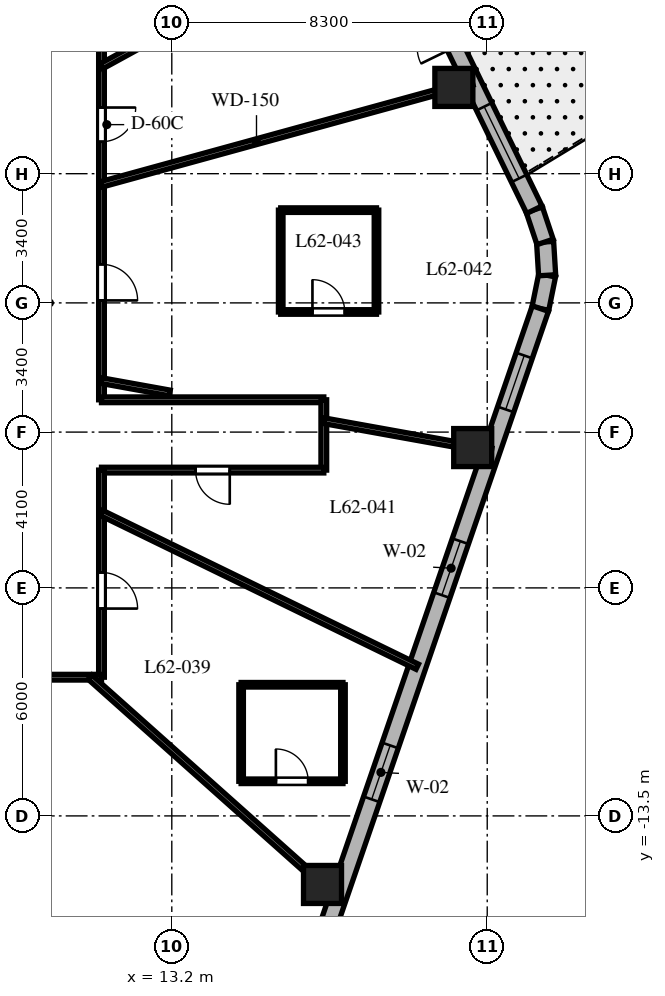
"""IFC4 building model, lengths in metres.
Left out: names, types, materials, properties, quantities, classifications, styles, units other than length and angle.
Written with IfcOpenShell. Run it as: python <this file> out.ifc"""

import sys

from ifc_helpers import new_model, si_unit, direction, frame, frame_2d, origin, origin_2d, place, context, subcontext, project, spatial, rectangle, extrude, element, fill, save


model = new_model("IFC4")
c1 = context("Model", 3, precision=1e-05, world=origin(), true_north=direction((0.0, 1.0)))
c2 = subcontext(c1, "Body", "Model", "MODEL_VIEW")
j1 = project(units=[si_unit("LENGTHUNIT", "METRE"), si_unit("PLANEANGLEUNIT", "RADIAN")], contexts=[c1])
p1 = place(None, origin())
s1 = spatial("IfcSite", under=j1, at=p1, CompositionType="ELEMENT")
p2 = place(p1, origin())
s2 = spatial("IfcBuilding", under=s1, at=p2, CompositionType="ELEMENT")
p3 = place(p2, frame((0.0, 0.0, 248.3)))
s3 = spatial("IfcBuildingStorey", under=s2, at=p3, CompositionType="ELEMENT", Elevation=248.3)
for number, where, z_axis, x_axis in (
    (1, (17.166, -15.304, 0.0), (0.0, 0.0, 1.0), (1.0, 0.0, 0.0)),
    (2, (21.118, -3.807, 0.0), (0.0, 0.0, 1.0), (1.0, 0.0, 0.0)),
    (3, (20.622, 5.67, 0.0), (0.0, 0.0, 1.0), (1.0, 0.0, 0.0)),
):
    element("IfcColumn", number, at=place(p3, frame(where, z_axis=z_axis, x_axis=x_axis)), inside=s3, PredefinedType="COLUMN", context=c2, shape_type="SweptSolid", body=[
        extrude(rectangle(XDim=1.0, YDim=1.0, at=origin_2d()), origin(), (0.0, 0.0, 1.0), 3.8),
    ])
p4 = place(p3, frame((22.898, -0.15, 0.0), z_axis=(0.0, 0.0, 1.0), x_axis=(0.199055826889, 0.979988151858, 0.0)))
e4 = element("IfcWall", 4, at=p4, inside=s3, PredefinedType="SOLIDWALL", context=c2, shape_type="SweptSolid", body=[
    extrude(rectangle(XDim=0.894, YDim=0.45, at=frame_2d((0.447, 0.0))), origin(), (0.0, 0.0, 1.0), 3.5),
])
p5 = place(p3, frame((23.076, 0.727, 0.0), z_axis=(0.0, 0.0, 1.0), x_axis=(-0.060805222108, 0.998149650586, 0.0)))
e5 = element("IfcWall", 5, at=p5, inside=s3, PredefinedType="SOLIDWALL", context=c2, shape_type="SweptSolid", body=[
    extrude(rectangle(XDim=0.879, YDim=0.45, at=frame_2d((0.44, 0.0))), origin(), (0.0, 0.0, 1.0), 3.5),
])
p6 = place(p3, frame((23.023, 1.604, 0.0), z_axis=(0.0, 0.0, 1.0), x_axis=(-0.316801227695, 0.948491951537, 0.0)))
e6 = element("IfcWall", 6, at=p6, inside=s3, PredefinedType="SOLIDWALL", context=c2, shape_type="SweptSolid", body=[
    extrude(rectangle(XDim=0.894, YDim=0.45, at=frame_2d((0.447, 0.0))), origin(), (0.0, 0.0, 1.0), 3.5),
])
p7 = place(p3, frame((16.324, -19.275, 0.0), z_axis=(0.0, 0.0, 1.0), x_axis=(0.325083142304, 0.945685439557, 0.0)))
e7 = element("IfcWall", 7, at=p7, inside=s3, PredefinedType="SOLIDWALL", context=c2, shape_type="SweptSolid", body=[
    extrude(rectangle(XDim=20.224, YDim=0.45, at=frame_2d((10.112, 0.0))), origin(), (0.0, 0.0, 1.0), 3.5),
])
p8 = place(p7, frame((1.253, 0.0, 0.8)))
e8 = element("IfcOpeningElement", 8, at=p8, cuts=e7, PredefinedType="OPENING", context=c2, shape_type="SweptSolid", body=[
    extrude(rectangle(XDim=1.5, YDim=1.8, at=frame_2d((0.75, 0.9))), frame((0.0, 0.235, 0.0), z_axis=(0.0, -1.0, 0.0), x_axis=(1.0, 0.0, 0.0)), (0.0, 0.0, 1.0), 0.47),
])
p9 = place(p7, frame((6.568, 0.0, 0.8)))
e9 = element("IfcOpeningElement", 9, at=p9, cuts=e7, PredefinedType="OPENING", context=c2, shape_type="SweptSolid", body=[
    extrude(rectangle(XDim=1.5, YDim=1.8, at=frame_2d((0.75, 0.9))), frame((0.0, 0.235, 0.0), z_axis=(0.0, -1.0, 0.0), x_axis=(1.0, 0.0, 0.0)), (0.0, 0.0, 1.0), 0.47),
])
p10 = place(p7, frame((12.25, 0.0, 0.8)))
e10 = element("IfcOpeningElement", 10, at=p10, cuts=e7, PredefinedType="OPENING", context=c2, shape_type="SweptSolid", body=[
    extrude(rectangle(XDim=1.5, YDim=1.8, at=frame_2d((0.75, 0.9))), frame((0.0, 0.235, 0.0), z_axis=(0.0, -1.0, 0.0), x_axis=(1.0, 0.0, 0.0)), (0.0, 0.0, 1.0), 0.47),
])
p11 = place(p7, frame((17.418, 0.0, 0.8)))
e11 = element("IfcOpeningElement", 11, at=p11, cuts=e7, PredefinedType="OPENING", context=c2, shape_type="SweptSolid", body=[
    extrude(rectangle(XDim=1.5, YDim=1.8, at=frame_2d((0.75, 0.9))), frame((0.0, 0.235, 0.0), z_axis=(0.0, -1.0, 0.0), x_axis=(1.0, 0.0, 0.0)), (0.0, 0.0, 1.0), 0.47),
])
p12 = place(p3, frame((22.74, 2.452, 0.0), z_axis=(0.0, 0.0, 1.0), x_axis=(-0.437753424814, 0.899095066755, 0.0)))
e12 = element("IfcWall", 12, at=p12, inside=s3, PredefinedType="SOLIDWALL", context=c2, shape_type="SweptSolid", body=[
    extrude(rectangle(XDim=19.137, YDim=0.45, at=frame_2d((9.569, 0.0))), origin(), (0.0, 0.0, 1.0), 3.5),
])
p13 = place(p12, frame((4.763, 0.0, 0.0)))
e13 = element("IfcOpeningElement", 13, at=p13, cuts=e12, PredefinedType="OPENING", context=c2, shape_type="SweptSolid", body=[
    extrude(rectangle(XDim=1.0, YDim=2.15, at=frame_2d((0.5, 1.075))), frame((0.0, 0.235, 0.0), z_axis=(0.0, -1.0, 0.0), x_axis=(1.0, 0.0, 0.0)), (0.0, 0.0, 1.0), 0.47),
])
p14 = place(p12, frame((6.611, 0.0, 0.8)))
e14 = element("IfcOpeningElement", 14, at=p14, cuts=e12, PredefinedType="OPENING", context=c2, shape_type="SweptSolid", body=[
    extrude(rectangle(XDim=1.2, YDim=1.8, at=frame_2d((0.6, 0.9))), frame((0.0, 0.235, 0.0), z_axis=(0.0, -1.0, 0.0), x_axis=(1.0, 0.0, 0.0)), (0.0, 0.0, 1.0), 0.47),
])
p15 = place(p12, frame((10.856, 0.0, 0.8)))
e15 = element("IfcOpeningElement", 15, at=p15, cuts=e12, PredefinedType="OPENING", context=c2, shape_type="SweptSolid", body=[
    extrude(rectangle(XDim=2.1, YDim=1.85, at=frame_2d((1.05, 0.925))), frame((0.0, 0.235, 0.0), z_axis=(0.0, -1.0, 0.0), x_axis=(1.0, 0.0, 0.0)), (0.0, 0.0, 1.0), 0.47),
])
p16 = place(p12, frame((16.173, 0.0, 0.8)))
e16 = element("IfcOpeningElement", 16, at=p16, cuts=e12, PredefinedType="OPENING", context=c2, shape_type="SweptSolid", body=[
    extrude(rectangle(XDim=2.1, YDim=1.85, at=frame_2d((1.05, 0.925))), frame((0.0, 0.235, 0.0), z_axis=(0.0, -1.0, 0.0), x_axis=(1.0, 0.0, 0.0)), (0.0, 0.0, 1.0), 0.47),
])
p17 = place(p12, frame((0.916, 0.0, 0.8)))
e17 = element("IfcOpeningElement", 17, at=p17, cuts=e12, PredefinedType="OPENING", context=c2, shape_type="SweptSolid", body=[
    extrude(rectangle(XDim=2.1, YDim=1.85, at=frame_2d((1.05, 0.925))), frame((0.0, 0.235, 0.0), z_axis=(0.0, -1.0, 0.0), x_axis=(1.0, 0.0, 0.0)), (0.0, 0.0, 1.0), 0.47),
])
p18 = place(p3, frame((11.35, 9.85, 0.0), z_axis=(0.0, 0.0, 1.0), x_axis=(0.0, -1.0, 0.0)))
e18 = element("IfcWall", 18, at=p18, inside=s3, PredefinedType="PARTITIONING", context=c2, shape_type="SweptSolid", body=[
    extrude(rectangle(XDim=12.4, YDim=0.15, at=frame_2d((6.2, 0.0))), origin(), (0.0, 0.0, 1.0), 2.99),
])
p19 = place(p18, frame((4.709, 0.0, 0.0)))
e19 = element("IfcOpeningElement", 19, at=p19, cuts=e18, PredefinedType="OPENING", context=c2, shape_type="SweptSolid", body=[
    extrude(rectangle(XDim=0.9, YDim=2.03, at=frame_2d((0.45, 1.015))), frame((0.0, 0.085, 0.0), z_axis=(0.0, -1.0, 0.0), x_axis=(1.0, 0.0, 0.0)), (0.0, 0.0, 1.0), 0.17),
])
p20 = place(p18, frame((1.457, 0.0, 0.0)))
e20 = element("IfcOpeningElement", 20, at=p20, cuts=e18, PredefinedType="OPENING", context=c2, shape_type="SweptSolid", body=[
    extrude(rectangle(XDim=0.95, YDim=2.03, at=frame_2d((0.475, 1.015))), frame((0.0, 0.085, 0.0), z_axis=(0.0, -1.0, 0.0), x_axis=(1.0, 0.0, 0.0)), (0.0, 0.0, 1.0), 0.17),
])
p21 = place(p18, frame((8.835, 0.0, 0.0)))
e21 = element("IfcOpeningElement", 21, at=p21, cuts=e18, PredefinedType="OPENING", context=c2, shape_type="SweptSolid", body=[
    extrude(rectangle(XDim=0.95, YDim=2.03, at=frame_2d((0.475, 1.015))), frame((0.0, 0.085, 0.0), z_axis=(0.0, -1.0, 0.0), x_axis=(1.0, 0.0, 0.0)), (0.0, 0.0, 1.0), 0.17),
])
p22 = place(p3, frame((11.35, -2.55, 0.0), z_axis=(0.0, 0.0, 1.0), x_axis=(1.0, 0.0, 0.0)))
e22 = element("IfcWall", 22, at=p22, inside=s3, PredefinedType="PARTITIONING", context=c2, shape_type="SweptSolid", body=[
    extrude(rectangle(XDim=5.85, YDim=0.15, at=frame_2d((2.925, 0.0))), origin(), (0.0, 0.0, 1.0), 2.94),
])
p23 = place(p3, frame((17.2, -2.55, 0.0), z_axis=(0.0, 0.0, 1.0), x_axis=(0.0, -1.0, 0.0)))
e23 = element("IfcWall", 23, at=p23, inside=s3, PredefinedType="PARTITIONING", context=c2, shape_type="SweptSolid", body=[
    extrude(rectangle(XDim=1.85, YDim=0.15, at=frame_2d((0.925, 0.0))), origin(), (0.0, 0.0, 1.0), 2.94),
])
p24 = place(p3, frame((17.2, -4.4, 0.0), z_axis=(0.0, 0.0, 1.0), x_axis=(-1.0, 0.0, 0.0)))
e24 = element("IfcWall", 24, at=p24, inside=s3, PredefinedType="PARTITIONING", context=c2, shape_type="SweptSolid", body=[
    extrude(rectangle(XDim=5.85, YDim=0.15, at=frame_2d((2.925, 0.0))), origin(), (0.0, 0.0, 1.0), 2.94),
])
p25 = place(p24, frame((2.475, 0.0, 0.0)))
e25 = element("IfcOpeningElement", 25, at=p25, cuts=e24, PredefinedType="OPENING", context=c2, shape_type="SweptSolid", body=[
    extrude(rectangle(XDim=0.9, YDim=2.03, at=frame_2d((0.45, 1.015))), frame((0.0, 0.085, 0.0), z_axis=(0.0, -1.0, 0.0), x_axis=(1.0, 0.0, 0.0)), (0.0, 0.0, 1.0), 0.17),
])
p26 = place(p3, frame((11.35, -4.4, 0.0), z_axis=(0.0, 0.0, 1.0), x_axis=(0.0, -1.0, 0.0)))
e26 = element("IfcWall", 26, at=p26, inside=s3, PredefinedType="PARTITIONING", context=c2, shape_type="SweptSolid", body=[
    extrude(rectangle(XDim=5.45, YDim=0.15, at=frame_2d((2.725, 0.0))), origin(), (0.0, 0.0, 1.0), 2.99),
])
p27 = place(p26, frame((2.694, 0.0, 0.0)))
e27 = element("IfcOpeningElement", 27, at=p27, cuts=e26, PredefinedType="OPENING", context=c2, shape_type="SweptSolid", body=[
    extrude(rectangle(XDim=0.95, YDim=2.03, at=frame_2d((0.475, 1.015))), frame((0.0, 0.085, 0.0), z_axis=(0.0, -1.0, 0.0), x_axis=(1.0, 0.0, 0.0)), (0.0, 0.0, 1.0), 0.17),
])
p28 = place(p3, frame((11.35, -9.85, 0.0), z_axis=(0.0, 0.0, 1.0), x_axis=(-1.0, 0.0, 0.0)))
e28 = element("IfcWall", 28, at=p28, inside=s3, PredefinedType="PARTITIONING", context=c2, shape_type="SweptSolid", body=[
    extrude(rectangle(XDim=10.43, YDim=0.15, at=frame_2d((5.215, 0.0))), origin(), (0.0, 0.0, 1.0), 2.99),
])
p29 = place(p28, frame((8.362, 0.0, 0.0)))
e29 = element("IfcOpeningElement", 29, at=p29, cuts=e28, PredefinedType="OPENING", context=c2, shape_type="SweptSolid", body=[
    extrude(rectangle(XDim=0.95, YDim=2.03, at=frame_2d((0.475, 1.015))), frame((0.0, 0.085, 0.0), z_axis=(0.0, -1.0, 0.0), x_axis=(1.0, 0.0, 0.0)), (0.0, 0.0, 1.0), 0.17),
])
p30 = place(p28, frame((3.396, 0.0, 0.0)))
e30 = element("IfcOpeningElement", 30, at=p30, cuts=e28, PredefinedType="OPENING", context=c2, shape_type="SweptSolid", body=[
    extrude(rectangle(XDim=0.95, YDim=2.03, at=frame_2d((0.475, 1.015))), frame((0.0, 0.085, 0.0), z_axis=(0.0, -1.0, 0.0), x_axis=(1.0, 0.0, 0.0)), (0.0, 0.0, 1.0), 0.17),
])
p31 = place(p3, frame((11.35, 3.121, 0.0), z_axis=(0.0, 0.0, 1.0), x_axis=(0.964212793822, 0.265129568758, 0.0)))
e31 = element("IfcWall", 31, at=p31, inside=s3, PredefinedType="PARTITIONING", context=c2, shape_type="SweptSolid", body=[
    extrude(rectangle(XDim=10.12, YDim=0.15, at=frame_2d((5.06, 0.0))), origin(), (0.0, 0.0, 1.0), 2.74),
])
p32 = place(p3, frame((11.35, 6.227, 0.0), z_axis=(0.0, 0.0, 1.0), x_axis=(0.876723190824, 0.480995266786, 0.0)))
e32 = element("IfcWall", 32, at=p32, inside=s3, PredefinedType="PARTITIONING", context=c2, shape_type="SweptSolid", body=[
    extrude(rectangle(XDim=8.598, YDim=0.15, at=frame_2d((4.299, 0.0))), origin(), (0.0, 0.0, 1.0), 2.74),
])
p33 = place(p3, frame((11.048, -9.85, 0.0), z_axis=(0.0, 0.0, 1.0), x_axis=(0.746444434655, -0.665447748492, 0.0)))
e33 = element("IfcWall", 33, at=p33, inside=s3, PredefinedType="PARTITIONING", context=c2, shape_type="SweptSolid", body=[
    extrude(rectangle(XDim=8.732, YDim=0.15, at=frame_2d((4.366, 0.0))), origin(), (0.0, 0.0, 1.0), 2.74),
])
p34 = place(p3, frame((11.35, -5.528, 0.0), z_axis=(0.0, 0.0, 1.0), x_axis=(0.899038669565, -0.437869239188, 0.0)))
e34 = element("IfcWall", 34, at=p34, inside=s3, PredefinedType="PARTITIONING", context=c2, shape_type="SweptSolid", body=[
    extrude(rectangle(XDim=9.242, YDim=0.15, at=frame_2d((4.621, 0.0))), origin(), (0.0, 0.0, 1.0), 2.74),
])
p35 = place(p3, frame((11.35, -2.046, 0.0), z_axis=(0.0, 0.0, 1.0), x_axis=(0.984127783205, -0.177461281195, 0.0)))
e35 = element("IfcWall", 35, at=p35, inside=s3, PredefinedType="PARTITIONING", context=c2, shape_type="SweptSolid", body=[
    extrude(rectangle(XDim=1.826, YDim=0.15, at=frame_2d((0.913, 0.0))), origin(), (0.0, 0.0, 1.0), 3.5),
])
p36 = place(p3, frame((17.2, -3.101, 0.0), z_axis=(0.0, 0.0, 1.0), x_axis=(0.98413465883, -0.177423147559, 0.0)))
e36 = element("IfcWall", 36, at=p36, inside=s3, PredefinedType="PARTITIONING", context=c2, shape_type="SweptSolid", body=[
    extrude(rectangle(XDim=4.482, YDim=0.15, at=frame_2d((2.241, 0.0))), origin(), (0.0, 0.0, 1.0), 2.74),
])
p37 = place(p3, frame((15.024, -12.589, 0.0), z_axis=(0.0, 0.0, 1.0), x_axis=(1.0, 0.0, 0.0)))
e37 = element("IfcWall", 37, at=p37, inside=s3, PredefinedType="PARTITIONING", context=c2, shape_type="SweptSolid", body=[
    extrude(rectangle(XDim=2.68, YDim=0.12, at=frame_2d((1.34, 0.0))), origin(), (0.0, 0.0, 1.0), 3.5),
])
p38 = place(p37, frame((0.915, 0.0, 0.0)))
e38 = element("IfcOpeningElement", 38, at=p38, cuts=e37, PredefinedType="OPENING", context=c2, shape_type="SweptSolid", body=[
    extrude(rectangle(XDim=0.85, YDim=2.03, at=frame_2d((0.425, 1.015))), frame((0.0, 0.07, 0.0), z_axis=(0.0, -1.0, 0.0), x_axis=(1.0, 0.0, 0.0)), (0.0, 0.0, 1.0), 0.14),
])
p39 = place(p3, frame((17.704, -12.589, 0.0), z_axis=(0.0, 0.0, 1.0), x_axis=(0.0, 1.0, 0.0)))
e39 = element("IfcWall", 39, at=p39, inside=s3, PredefinedType="PARTITIONING", context=c2, shape_type="SweptSolid", body=[
    extrude(rectangle(XDim=2.54, YDim=0.12, at=frame_2d((1.27, 0.0))), origin(), (0.0, 0.0, 1.0), 3.5),
])
p40 = place(p3, frame((17.704, -10.049, 0.0), z_axis=(0.0, 0.0, 1.0), x_axis=(-1.0, 0.0, 0.0)))
e40 = element("IfcWall", 40, at=p40, inside=s3, PredefinedType="PARTITIONING", context=c2, shape_type="SweptSolid", body=[
    extrude(rectangle(XDim=2.68, YDim=0.12, at=frame_2d((1.34, 0.0))), origin(), (0.0, 0.0, 1.0), 3.072),
])
p41 = place(p3, frame((15.024, -10.049, 0.0), z_axis=(0.0, 0.0, 1.0), x_axis=(0.0, -1.0, 0.0)))
e41 = element("IfcWall", 41, at=p41, inside=s3, PredefinedType="PARTITIONING", context=c2, shape_type="SweptSolid", body=[
    extrude(rectangle(XDim=2.54, YDim=0.12, at=frame_2d((1.27, 0.0))), origin(), (0.0, 0.0, 1.0), 3.072),
])
p42 = place(p3, frame((16.066, -0.239, 0.0), z_axis=(0.0, 0.0, 1.0), x_axis=(1.0, 0.0, 0.0)))
e42 = element("IfcWall", 42, at=p42, inside=s3, PredefinedType="PARTITIONING", context=c2, shape_type="SweptSolid", body=[
    extrude(rectangle(XDim=2.52, YDim=0.12, at=frame_2d((1.26, 0.0))), origin(), (0.0, 0.0, 1.0), 2.94),
])
p43 = place(p42, frame((0.835, 0.0, 0.0)))
e43 = element("IfcOpeningElement", 43, at=p43, cuts=e42, PredefinedType="OPENING", context=c2, shape_type="SweptSolid", body=[
    extrude(rectangle(XDim=0.85, YDim=2.03, at=frame_2d((0.425, 1.015))), frame((0.0, 0.07, 0.0), z_axis=(0.0, -1.0, 0.0), x_axis=(1.0, 0.0, 0.0)), (0.0, 0.0, 1.0), 0.14),
])
p44 = place(p3, frame((18.586, -0.239, 0.0), z_axis=(0.0, 0.0, 1.0), x_axis=(0.0, 1.0, 0.0)))
e44 = element("IfcWall", 44, at=p44, inside=s3, PredefinedType="PARTITIONING", context=c2, shape_type="SweptSolid", body=[
    extrude(rectangle(XDim=2.68, YDim=0.12, at=frame_2d((1.34, 0.0))), origin(), (0.0, 0.0, 1.0), 3.5),
])
p45 = place(p3, frame((18.586, 2.441, 0.0), z_axis=(0.0, 0.0, 1.0), x_axis=(-1.0, 0.0, 0.0)))
e45 = element("IfcWall", 45, at=p45, inside=s3, PredefinedType="PARTITIONING", context=c2, shape_type="SweptSolid", body=[
    extrude(rectangle(XDim=2.52, YDim=0.12, at=frame_2d((1.26, 0.0))), origin(), (0.0, 0.0, 1.0), 2.94),
])
p46 = place(p3, frame((16.066, 2.441, 0.0), z_axis=(0.0, 0.0, 1.0), x_axis=(0.0, -1.0, 0.0)))
e46 = element("IfcWall", 46, at=p46, inside=s3, PredefinedType="PARTITIONING", context=c2, shape_type="SweptSolid", body=[
    extrude(rectangle(XDim=2.68, YDim=0.12, at=frame_2d((1.34, 0.0))), origin(), (0.0, 0.0, 1.0), 3.5),
])
p47 = place(p9, origin())
e47 = element("IfcWindow", 47, at=p47, inside=s3, PartitioningType="SINGLE_PANEL", PredefinedType="WINDOW", context=c2, shape_type="SweptSolid", body=[
    extrude(rectangle(XDim=1.5, YDim=1.8, at=frame_2d((0.75, 0.9))), frame((0.0, 0.03, 0.0), z_axis=(0.0, -1.0, 0.0), x_axis=(1.0, 0.0, 0.0)), (0.0, 0.0, 1.0), 0.06),
])
fill(e9, e47)
p48 = place(p10, origin())
e48 = element("IfcWindow", 48, at=p48, inside=s3, PartitioningType="SINGLE_PANEL", PredefinedType="WINDOW", context=c2, shape_type="SweptSolid", body=[
    extrude(rectangle(XDim=1.5, YDim=1.8, at=frame_2d((0.75, 0.9))), frame((0.0, 0.03, 0.0), z_axis=(0.0, -1.0, 0.0), x_axis=(1.0, 0.0, 0.0)), (0.0, 0.0, 1.0), 0.06),
])
fill(e10, e48)
p49 = place(p11, origin())
e49 = element("IfcWindow", 49, at=p49, inside=s3, PartitioningType="SINGLE_PANEL", PredefinedType="WINDOW", context=c2, shape_type="SweptSolid", body=[
    extrude(rectangle(XDim=1.5, YDim=1.8, at=frame_2d((0.75, 0.9))), frame((0.0, 0.03, 0.0), z_axis=(0.0, -1.0, 0.0), x_axis=(1.0, 0.0, 0.0)), (0.0, 0.0, 1.0), 0.06),
])
fill(e11, e49)
p50 = place(p17, origin())
e50 = element("IfcWindow", 50, at=p50, inside=s3, PartitioningType="SINGLE_PANEL", PredefinedType="WINDOW", context=c2, shape_type="SweptSolid", body=[
    extrude(rectangle(XDim=2.1, YDim=1.85, at=frame_2d((1.05, 0.925))), frame((0.0, 0.03, 0.0), z_axis=(0.0, -1.0, 0.0), x_axis=(1.0, 0.0, 0.0)), (0.0, 0.0, 1.0), 0.06),
])
fill(e17, e50)
p51 = place(p19, origin())
e51 = element("IfcDoor", 51, at=p51, inside=s3, OperationType="SINGLE_SWING_LEFT", PredefinedType="DOOR", context=c2, shape_type="SweptSolid", body=[
    extrude(rectangle(XDim=0.9, YDim=2.03, at=frame_2d((0.45, 1.015))), frame((0.0, 0.025, 0.0), z_axis=(0.0, -1.0, 0.0), x_axis=(1.0, 0.0, 0.0)), (0.0, 0.0, 1.0), 0.05),
])
fill(e19, e51)
p52 = place(p27, origin())
e52 = element("IfcDoor", 52, at=p52, inside=s3, OperationType="SINGLE_SWING_RIGHT", PredefinedType="DOOR", context=c2, shape_type="SweptSolid", body=[
    extrude(rectangle(XDim=0.95, YDim=2.03, at=frame_2d((0.475, 1.015))), frame((0.0, 0.025, 0.0), z_axis=(0.0, -1.0, 0.0), x_axis=(1.0, 0.0, 0.0)), (0.0, 0.0, 1.0), 0.05),
])
fill(e27, e52)
p53 = place(p38, origin())
e53 = element("IfcDoor", 53, at=p53, inside=s3, OperationType="SINGLE_SWING_LEFT", PredefinedType="DOOR", context=c2, shape_type="SweptSolid", body=[
    extrude(rectangle(XDim=0.85, YDim=2.03, at=frame_2d((0.425, 1.015))), frame((0.0, 0.025, 0.0), z_axis=(0.0, -1.0, 0.0), x_axis=(1.0, 0.0, 0.0)), (0.0, 0.0, 1.0), 0.05),
])
fill(e38, e53)
p54 = place(p25, origin())
e54 = element("IfcDoor", 54, at=p54, inside=s3, OperationType="SINGLE_SWING_LEFT", PredefinedType="DOOR", context=c2, shape_type="SweptSolid", body=[
    extrude(rectangle(XDim=0.9, YDim=2.03, at=frame_2d((0.45, 1.015))), frame((0.0, 0.025, 0.0), z_axis=(0.0, -1.0, 0.0), x_axis=(1.0, 0.0, 0.0)), (0.0, 0.0, 1.0), 0.05),
])
fill(e25, e54)
p55 = place(p21, origin())
e55 = element("IfcDoor", 55, at=p55, inside=s3, OperationType="SINGLE_SWING_RIGHT", PredefinedType="DOOR", context=c2, shape_type="SweptSolid", body=[
    extrude(rectangle(XDim=0.95, YDim=2.03, at=frame_2d((0.475, 1.015))), frame((0.0, 0.025, 0.0), z_axis=(0.0, -1.0, 0.0), x_axis=(1.0, 0.0, 0.0)), (0.0, 0.0, 1.0), 0.05),
])
fill(e21, e55)
p56 = place(p43, origin())
e56 = element("IfcDoor", 56, at=p56, inside=s3, OperationType="SINGLE_SWING_LEFT", PredefinedType="DOOR", context=c2, shape_type="SweptSolid", body=[
    extrude(rectangle(XDim=0.85, YDim=2.03, at=frame_2d((0.425, 1.015))), frame((0.0, 0.025, 0.0), z_axis=(0.0, -1.0, 0.0), x_axis=(1.0, 0.0, 0.0)), (0.0, 0.0, 1.0), 0.05),
])
fill(e43, e56)
save(model, sys.argv[1])
